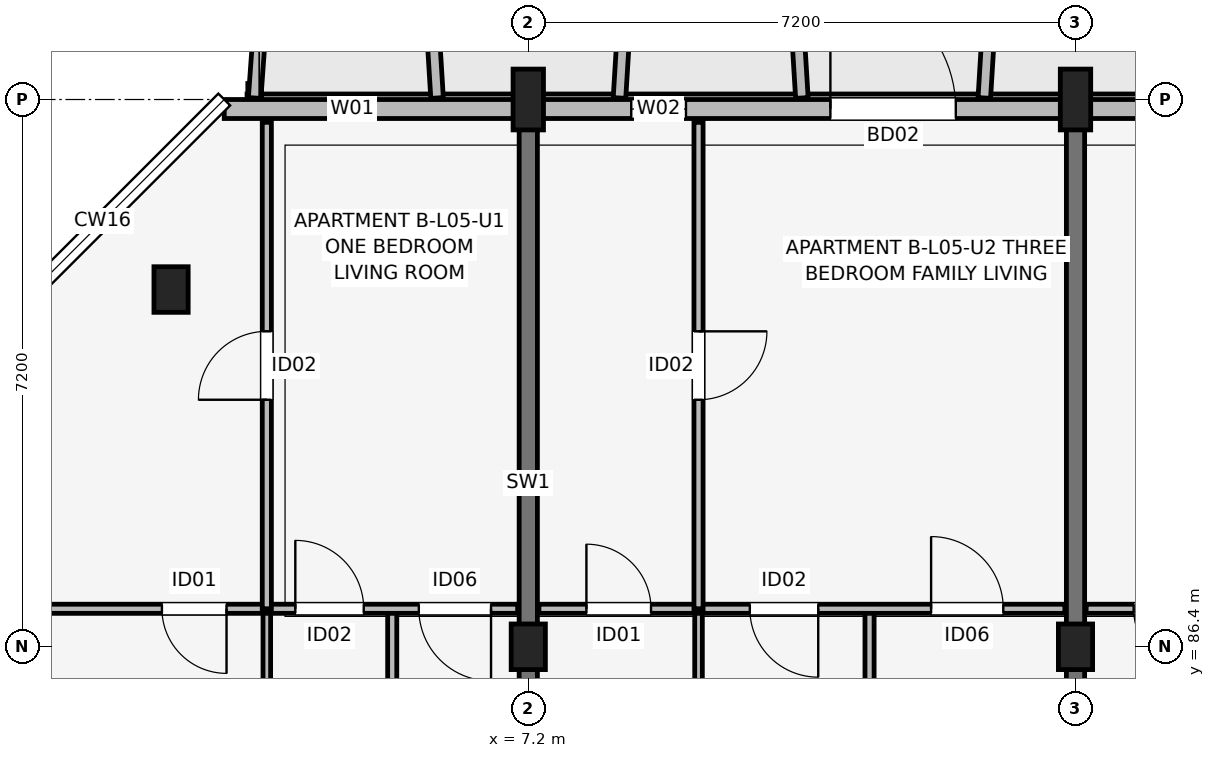
"""IFC4 building model, lengths in metres.
Left out: names, types, materials, properties, quantities, classifications, styles, units other than length and angle.
Written with IfcOpenShell. Run it as: python <this file> out.ifc"""

import sys

from ifc_helpers import new_model, si_unit, direction, frame, frame_2d, origin, origin_2d, place, context, subcontext, project, spatial, rectangle, extrude, element, fill, save


model = new_model("IFC4")
c1 = context("Model", 3, precision=1e-05, world=origin(), true_north=direction((0.0, 1.0)))
c2 = subcontext(c1, "Body", "Model", "MODEL_VIEW")
j1 = project(units=[si_unit("LENGTHUNIT", "METRE"), si_unit("PLANEANGLEUNIT", "RADIAN")], contexts=[c1])
p1 = place(None, origin())
s1 = spatial("IfcSite", under=j1, at=p1, CompositionType="ELEMENT")
p2 = place(p1, origin())
s2 = spatial("IfcBuilding", under=s1, at=p2, CompositionType="ELEMENT")
p3 = place(p2, frame((0.0, 0.0, 18.15)))
s3 = spatial("IfcBuildingStorey", under=s2, at=p3, CompositionType="ELEMENT", Elevation=18.15)
for number, where, z_axis, x_axis in (
    (1, (2.5, 91.1, 0.0), (0.0, 0.0, 1.0), (1.0, 0.0, 0.0)),
    (2, (7.2, 86.4, 0.0), (0.0, 0.0, 1.0), (1.0, 0.0, 0.0)),
):
    element("IfcColumn", number, at=place(p3, frame(where, z_axis=z_axis, x_axis=x_axis)), inside=s3, PredefinedType="COLUMN", context=c2, shape_type="SweptSolid", body=[
        extrude(rectangle(XDim=0.45, YDim=0.6, at=origin_2d()), origin(), (0.0, 0.0, 1.0), 3.15),
    ])
p4 = place(p3, frame((7.2, 93.6, 0.0), z_axis=(0.0, 0.0, 1.0), x_axis=(1.0, 0.0, 0.0)))
e3 = element("IfcColumn", 3, at=p4, inside=s3, PredefinedType="COLUMN", context=c2, shape_type="SweptSolid", body=[
    extrude(rectangle(XDim=0.4, YDim=0.8, at=origin_2d()), origin(), (0.0, 0.0, 1.0), 3.15),
])
p5 = place(p3, frame((14.4, 86.4, 0.0), z_axis=(0.0, 0.0, 1.0), x_axis=(1.0, 0.0, 0.0)))
e4 = element("IfcColumn", 4, at=p5, inside=s3, PredefinedType="COLUMN", context=c2, shape_type="SweptSolid", body=[
    extrude(rectangle(XDim=0.45, YDim=0.6, at=origin_2d()), origin(), (0.0, 0.0, 1.0), 3.15),
])
p6 = place(p3, frame((14.4, 93.6, 0.0), z_axis=(0.0, 0.0, 1.0), x_axis=(1.0, 0.0, 0.0)))
e5 = element("IfcColumn", 5, at=p6, inside=s3, PredefinedType="COLUMN", context=c2, shape_type="SweptSolid", body=[
    extrude(rectangle(XDim=0.4, YDim=0.8, at=origin_2d()), origin(), (0.0, 0.0, 1.0), 3.15),
])
for number, where, z_axis, x_axis in (
    (6, (7.2, 83.85, 0.0), (0.0, 0.0, 1.0), (0.0, 1.0, 0.0)),
    (7, (14.4, 83.85, 0.0), (0.0, 0.0, 1.0), (0.0, 1.0, 0.0)),
):
    element("IfcWall", number, at=place(p3, frame(where, z_axis=z_axis, x_axis=x_axis)), inside=s3, PredefinedType="SHEAR", context=c2, shape_type="SweptSolid", body=[
        extrude(rectangle(XDim=9.4, YDim=0.24, at=frame_2d((4.7, 0.0))), origin(), (0.0, 0.0, 1.0), 3.15),
    ])
p7 = place(p3, frame((32.8, 93.475, 0.0), z_axis=(0.0, 0.0, 1.0), x_axis=(-1.0, 0.0, 0.0)))
e8 = element("IfcWall", 8, at=p7, inside=s3, PredefinedType="SOLIDWALL", context=c2, shape_type="SweptSolid", body=[
    extrude(rectangle(XDim=29.6, YDim=0.25, at=frame_2d((14.8, 0.0))), origin(), (0.0, 0.0, 1.0), 2.43),
])
p8 = place(p7, frame((21.625, 0.0, 0.0), z_axis=(0.0, 0.0, 1.0), x_axis=(-1.0, 0.0, 0.0)))
e9 = element("IfcOpeningElement", 9, at=p8, cuts=e8, PredefinedType="OPENING", context=c2, shape_type="SweptSolid", body=[
    extrude(rectangle(XDim=1.65, YDim=2.15, at=frame_2d((0.825, 1.075))), frame((0.0, 0.135, 0.0), z_axis=(0.0, -1.0, 0.0), x_axis=(1.0, 0.0, 0.0)), (0.0, 0.0, 1.0), 0.27),
])
p9 = place(p7, frame((7.15, 0.0, 0.0), z_axis=(0.0, 0.0, 1.0), x_axis=(-1.0, 0.0, 0.0)))
e10 = element("IfcOpeningElement", 10, at=p9, cuts=e8, PredefinedType="OPENING", context=c2, shape_type="SweptSolid", body=[
    extrude(rectangle(XDim=1.5, YDim=2.15, at=frame_2d((0.75, 1.075))), frame((0.0, 0.135, 0.0), z_axis=(0.0, -1.0, 0.0), x_axis=(1.0, 0.0, 0.0)), (0.0, 0.0, 1.0), 0.27),
])
p10 = place(p7, frame((27.615, 0.0, 0.75)))
e11 = element("IfcOpeningElement", 11, at=p10, cuts=e8, PredefinedType="OPENING", context=c2, shape_type="SweptSolid", body=[
    extrude(rectangle(XDim=0.6, YDim=1.25, at=frame_2d((0.3, 0.625))), frame((0.0, 0.135, 0.0), z_axis=(0.0, -1.0, 0.0), x_axis=(1.0, 0.0, 0.0)), (0.0, 0.0, 1.0), 0.27),
])
p11 = place(p7, frame((23.525, 0.0, 0.75)))
e12 = element("IfcOpeningElement", 12, at=p11, cuts=e8, PredefinedType="OPENING", context=c2, shape_type="SweptSolid", body=[
    extrude(rectangle(XDim=0.72, YDim=1.35, at=frame_2d((0.36, 0.675))), frame((0.0, 0.135, 0.0), z_axis=(0.0, -1.0, 0.0), x_axis=(1.0, 0.0, 0.0)), (0.0, 0.0, 1.0), 0.27),
])
p12 = place(p7, frame((15.0, 0.0, 0.67)))
e13 = element("IfcOpeningElement", 13, at=p12, cuts=e8, PredefinedType="OPENING", context=c2, shape_type="SweptSolid", body=[
    extrude(rectangle(XDim=2.0, YDim=1.65, at=frame_2d((1.0, 0.825))), frame((0.0, 0.135, 0.0), z_axis=(0.0, -1.0, 0.0), x_axis=(1.0, 0.0, 0.0)), (0.0, 0.0, 1.0), 0.27),
])
p13 = place(p7, frame((9.125, 0.0, 0.75)))
e14 = element("IfcOpeningElement", 14, at=p13, cuts=e8, PredefinedType="OPENING", context=c2, shape_type="SweptSolid", body=[
    extrude(rectangle(XDim=0.72, YDim=1.35, at=frame_2d((0.36, 0.675))), frame((0.0, 0.135, 0.0), z_axis=(0.0, -1.0, 0.0), x_axis=(1.0, 0.0, 0.0)), (0.0, 0.0, 1.0), 0.27),
])
p14 = place(p7, frame((0.525, 0.0, 0.67)))
e15 = element("IfcOpeningElement", 15, at=p14, cuts=e8, PredefinedType="OPENING", context=c2, shape_type="SweptSolid", body=[
    extrude(rectangle(XDim=2.15, YDim=1.65, at=frame_2d((1.075, 0.825))), frame((0.0, 0.135, 0.0), z_axis=(0.0, -1.0, 0.0), x_axis=(1.0, 0.0, 0.0)), (0.0, 0.0, 1.0), 0.27),
])
p15 = place(p3, frame((3.6, 93.62, 0.0), z_axis=(0.0, 0.0, 1.0), x_axis=(0.071194071069, 0.997462482625, 0.0)))
e16 = element("IfcWall", 16, at=p15, inside=s3, PredefinedType="ELEMENTEDWALL", context=c2, shape_type="SweptSolid", body=[
    extrude(rectangle(XDim=1.965, YDim=0.165, at=frame_2d((0.982, 0.0))), origin(), (0.0, 0.0, 1.0), 2.95),
])
p16 = place(p3, frame((6.0, 93.62, 0.0), z_axis=(0.0, 0.0, 1.0), x_axis=(-0.061170732449, 0.998127317276, 0.0)))
e17 = element("IfcWall", 17, at=p16, inside=s3, PredefinedType="ELEMENTEDWALL", context=c2, shape_type="SweptSolid", body=[
    extrude(rectangle(XDim=1.964, YDim=0.165, at=frame_2d((0.982, 0.0))), origin(), (0.0, 0.0, 1.0), 2.95),
])
for number, where, z_axis, x_axis in (
    (18, (8.4, 93.62, 0.0), (0.0, 0.0, 1.0), (0.061, 0.998, 0.0)),
    (19, (10.8, 93.62, 0.0), (0.0, 0.0, 1.0), (-0.061, 0.998, 0.0)),
    (20, (13.2, 93.62, 0.0), (0.0, 0.0, 1.0), (0.061, 0.998, 0.0)),
):
    element("IfcWall", number, at=place(p3, frame(where, z_axis=z_axis, x_axis=x_axis)), inside=s3, PredefinedType="ELEMENTEDWALL", context=c2, shape_type="SweptSolid", body=[
        extrude(rectangle(XDim=1.964, YDim=0.165, at=frame_2d((0.982, 0.0))), origin(), (0.0, 0.0, 1.0), 2.53),
    ])
p17 = place(p3, frame((3.76, 83.7, 0.0), z_axis=(0.0, 0.0, 1.0), x_axis=(0.0, 1.0, 0.0)))
e21 = element("IfcWall", 21, at=p17, inside=s3, PredefinedType="PARTITIONING", context=c2, shape_type="SweptSolid", body=[
    extrude(rectangle(XDim=3.2, YDim=0.1, at=frame_2d((1.6, 0.0))), origin(), (0.0, 0.0, 1.0), 2.375),
])
p18 = place(p3, frame((5.41, 83.7, 0.0), z_axis=(0.0, 0.0, 1.0), x_axis=(0.0, 1.0, 0.0)))
e22 = element("IfcWall", 22, at=p18, inside=s3, PredefinedType="PARTITIONING", context=c2, shape_type="SweptSolid", body=[
    extrude(rectangle(XDim=3.2, YDim=0.12, at=frame_2d((1.6, 0.0))), origin(), (0.0, 0.0, 1.0), 2.375),
])
p19 = place(p3, frame((0.14, 86.9, 0.0), z_axis=(0.0, 0.0, 1.0), x_axis=(1.0, 0.0, 0.0)))
e23 = element("IfcWall", 23, at=p19, inside=s3, PredefinedType="PARTITIONING", context=c2, shape_type="SweptSolid", body=[
    extrude(rectangle(XDim=6.92, YDim=0.12, at=frame_2d((3.46, 0.0))), origin(), (0.0, 0.0, 1.0), 2.38),
])
p20 = place(p19, frame((3.09, 0.0, 0.0), z_axis=(0.0, 0.0, 1.0), x_axis=(-1.0, 0.0, 0.0)))
e24 = element("IfcOpeningElement", 24, at=p20, cuts=e23, PredefinedType="OPENING", context=c2, shape_type="SweptSolid", body=[
    extrude(rectangle(XDim=0.85, YDim=2.08, at=frame_2d((0.425, 1.04))), frame((0.0, 0.07, 0.0), z_axis=(0.0, -1.0, 0.0), x_axis=(1.0, 0.0, 0.0)), (0.0, 0.0, 1.0), 0.14),
])
p21 = place(p19, frame((3.995, 0.0, 0.0)))
e25 = element("IfcOpeningElement", 25, at=p21, cuts=e23, PredefinedType="OPENING", context=c2, shape_type="SweptSolid", body=[
    extrude(rectangle(XDim=0.9, YDim=2.08, at=frame_2d((0.45, 1.04))), frame((0.0, 0.07, 0.0), z_axis=(0.0, -1.0, 0.0), x_axis=(1.0, 0.0, 0.0)), (0.0, 0.0, 1.0), 0.14),
])
p22 = place(p19, frame((6.57, 0.0, 0.0), z_axis=(0.0, 0.0, 1.0), x_axis=(-1.0, 0.0, 0.0)))
e26 = element("IfcOpeningElement", 26, at=p22, cuts=e23, PredefinedType="OPENING", context=c2, shape_type="SweptSolid", body=[
    extrude(rectangle(XDim=0.95, YDim=2.08, at=frame_2d((0.475, 1.04))), frame((0.0, 0.07, 0.0), z_axis=(0.0, -1.0, 0.0), x_axis=(1.0, 0.0, 0.0)), (0.0, 0.0, 1.0), 0.14),
])
p23 = place(p3, frame((3.76, 86.9, 0.0), z_axis=(0.0, 0.0, 1.0), x_axis=(0.0, 1.0, 0.0)))
e27 = element("IfcWall", 27, at=p23, inside=s3, PredefinedType="PARTITIONING", context=c2, shape_type="SweptSolid", body=[
    extrude(rectangle(XDim=6.4, YDim=0.12, at=frame_2d((3.2, 0.0))), origin(), (0.0, 0.0, 1.0), 2.38),
])
p24 = place(p23, frame((2.75, 0.0, 0.0)))
e28 = element("IfcOpeningElement", 28, at=p24, cuts=e27, PredefinedType="OPENING", context=c2, shape_type="SweptSolid", body=[
    extrude(rectangle(XDim=0.9, YDim=2.08, at=frame_2d((0.45, 1.04))), frame((0.0, 0.07, 0.0), z_axis=(0.0, -1.0, 0.0), x_axis=(1.0, 0.0, 0.0)), (0.0, 0.0, 1.0), 0.14),
])
p25 = place(p3, frame((9.44, 83.7, 0.0), z_axis=(0.0, 0.0, 1.0), x_axis=(0.0, 1.0, 0.0)))
e29 = element("IfcWall", 29, at=p25, inside=s3, PredefinedType="PARTITIONING", context=c2, shape_type="SweptSolid", body=[
    extrude(rectangle(XDim=3.2, YDim=0.1, at=frame_2d((1.6, 0.0))), origin(), (0.0, 0.0, 1.0), 2.375),
])
p26 = place(p3, frame((11.69, 83.7, 0.0), z_axis=(0.0, 0.0, 1.0), x_axis=(0.0, 1.0, 0.0)))
e30 = element("IfcWall", 30, at=p26, inside=s3, PredefinedType="PARTITIONING", context=c2, shape_type="SweptSolid", body=[
    extrude(rectangle(XDim=3.2, YDim=0.12, at=frame_2d((1.6, 0.0))), origin(), (0.0, 0.0, 1.0), 2.375),
])
p27 = place(p3, frame((7.34, 86.9, 0.0), z_axis=(0.0, 0.0, 1.0), x_axis=(1.0, 0.0, 0.0)))
e31 = element("IfcWall", 31, at=p27, inside=s3, PredefinedType="PARTITIONING", context=c2, shape_type="SweptSolid", body=[
    extrude(rectangle(XDim=6.92, YDim=0.12, at=frame_2d((3.46, 0.0))), origin(), (0.0, 0.0, 1.0), 2.38),
])
p28 = place(p27, frame((0.625, 0.0, 0.0)))
e32 = element("IfcOpeningElement", 32, at=p28, cuts=e31, PredefinedType="OPENING", context=c2, shape_type="SweptSolid", body=[
    extrude(rectangle(XDim=0.85, YDim=2.08, at=frame_2d((0.425, 1.04))), frame((0.0, 0.07, 0.0), z_axis=(0.0, -1.0, 0.0), x_axis=(1.0, 0.0, 0.0)), (0.0, 0.0, 1.0), 0.14),
])
p29 = place(p27, frame((3.675, 0.0, 0.0), z_axis=(0.0, 0.0, 1.0), x_axis=(-1.0, 0.0, 0.0)))
e33 = element("IfcOpeningElement", 33, at=p29, cuts=e31, PredefinedType="OPENING", context=c2, shape_type="SweptSolid", body=[
    extrude(rectangle(XDim=0.9, YDim=2.08, at=frame_2d((0.45, 1.04))), frame((0.0, 0.07, 0.0), z_axis=(0.0, -1.0, 0.0), x_axis=(1.0, 0.0, 0.0)), (0.0, 0.0, 1.0), 0.14),
])
p30 = place(p27, frame((5.16, 0.0, 0.0)))
e34 = element("IfcOpeningElement", 34, at=p30, cuts=e31, PredefinedType="OPENING", context=c2, shape_type="SweptSolid", body=[
    extrude(rectangle(XDim=0.95, YDim=2.08, at=frame_2d((0.475, 1.04))), frame((0.0, 0.07, 0.0), z_axis=(0.0, -1.0, 0.0), x_axis=(1.0, 0.0, 0.0)), (0.0, 0.0, 1.0), 0.14),
])
p31 = place(p3, frame((9.44, 86.9, 0.0), z_axis=(0.0, 0.0, 1.0), x_axis=(0.0, 1.0, 0.0)))
e35 = element("IfcWall", 35, at=p31, inside=s3, PredefinedType="PARTITIONING", context=c2, shape_type="SweptSolid", body=[
    extrude(rectangle(XDim=6.4, YDim=0.12, at=frame_2d((3.2, 0.0))), origin(), (0.0, 0.0, 1.0), 2.38),
])
p32 = place(p31, frame((3.65, 0.0, 0.0), z_axis=(0.0, 0.0, 1.0), x_axis=(-1.0, 0.0, 0.0)))
e36 = element("IfcOpeningElement", 36, at=p32, cuts=e35, PredefinedType="OPENING", context=c2, shape_type="SweptSolid", body=[
    extrude(rectangle(XDim=0.9, YDim=2.08, at=frame_2d((0.45, 1.04))), frame((0.0, 0.07, 0.0), z_axis=(0.0, -1.0, 0.0), x_axis=(1.0, 0.0, 0.0)), (0.0, 0.0, 1.0), 0.14),
])
p33 = place(p3, frame((14.54, 86.9, 0.0), z_axis=(0.0, 0.0, 1.0), x_axis=(1.0, 0.0, 0.0)))
e37 = element("IfcWall", 37, at=p33, inside=s3, PredefinedType="PARTITIONING", context=c2, shape_type="SweptSolid", body=[
    extrude(rectangle(XDim=6.92, YDim=0.12, at=frame_2d((3.46, 0.0))), origin(), (0.0, 0.0, 1.0), 2.38),
])
p34 = place(p33, frame((1.475, 0.0, 0.0), z_axis=(0.0, 0.0, 1.0), x_axis=(-1.0, 0.0, 0.0)))
e38 = element("IfcOpeningElement", 38, at=p34, cuts=e37, PredefinedType="OPENING", context=c2, shape_type="SweptSolid", body=[
    extrude(rectangle(XDim=0.85, YDim=2.08, at=frame_2d((0.425, 1.04))), frame((0.0, 0.07, 0.0), z_axis=(0.0, -1.0, 0.0), x_axis=(1.0, 0.0, 0.0)), (0.0, 0.0, 1.0), 0.14),
])
p35 = place(p33, frame((2.625, 0.0, 0.0)))
e39 = element("IfcOpeningElement", 39, at=p35, cuts=e37, PredefinedType="OPENING", context=c2, shape_type="SweptSolid", body=[
    extrude(rectangle(XDim=0.9, YDim=2.08, at=frame_2d((0.45, 1.04))), frame((0.0, 0.07, 0.0), z_axis=(0.0, -1.0, 0.0), x_axis=(1.0, 0.0, 0.0)), (0.0, 0.0, 1.0), 0.14),
])
p36 = place(p33, frame((5.96, 0.0, 0.0), z_axis=(0.0, 0.0, 1.0), x_axis=(-1.0, 0.0, 0.0)))
e40 = element("IfcOpeningElement", 40, at=p36, cuts=e37, PredefinedType="OPENING", context=c2, shape_type="SweptSolid", body=[
    extrude(rectangle(XDim=0.95, YDim=2.08, at=frame_2d((0.475, 1.04))), frame((0.0, 0.07, 0.0), z_axis=(0.0, -1.0, 0.0), x_axis=(1.0, 0.0, 0.0)), (0.0, 0.0, 1.0), 0.14),
])
p37 = place(p8, origin())
e41 = element("IfcDoor", 41, at=p37, inside=s3, OperationType="SINGLE_SWING_RIGHT", PredefinedType="DOOR", context=c2, shape_type="SweptSolid", body=[
    extrude(rectangle(XDim=1.65, YDim=2.15, at=frame_2d((0.825, 1.075))), frame((0.0, 0.025, 0.0), z_axis=(0.0, -1.0, 0.0), x_axis=(1.0, 0.0, 0.0)), (0.0, 0.0, 1.0), 0.05),
])
fill(e9, e41)
p38 = place(p10, origin())
e42 = element("IfcWindow", 42, at=p38, inside=s3, PartitioningType="SINGLE_PANEL", PredefinedType="WINDOW", context=c2, shape_type="SweptSolid", body=[
    extrude(rectangle(XDim=0.6, YDim=1.25, at=frame_2d((0.3, 0.625))), frame((0.0, 0.03, 0.0), z_axis=(0.0, -1.0, 0.0), x_axis=(1.0, 0.0, 0.0)), (0.0, 0.0, 1.0), 0.06),
])
fill(e11, e42)
p39 = place(p11, origin())
e43 = element("IfcWindow", 43, at=p39, inside=s3, PartitioningType="SINGLE_PANEL", PredefinedType="WINDOW", context=c2, shape_type="SweptSolid", body=[
    extrude(rectangle(XDim=0.72, YDim=1.35, at=frame_2d((0.36, 0.675))), frame((0.0, 0.03, 0.0), z_axis=(0.0, -1.0, 0.0), x_axis=(1.0, 0.0, 0.0)), (0.0, 0.0, 1.0), 0.06),
])
fill(e12, e43)
p40 = place(p20, origin())
e44 = element("IfcDoor", 44, at=p40, inside=s3, OperationType="SINGLE_SWING_RIGHT", PredefinedType="DOOR", context=c2, shape_type="SweptSolid", body=[
    extrude(rectangle(XDim=0.85, YDim=2.08, at=frame_2d((0.425, 1.04))), frame((0.0, 0.025, 0.0), z_axis=(0.0, -1.0, 0.0), x_axis=(1.0, 0.0, 0.0)), (0.0, 0.0, 1.0), 0.05),
])
fill(e24, e44)
p41 = place(p21, origin())
e45 = element("IfcDoor", 45, at=p41, inside=s3, OperationType="SINGLE_SWING_LEFT", PredefinedType="DOOR", context=c2, shape_type="SweptSolid", body=[
    extrude(rectangle(XDim=0.9, YDim=2.08, at=frame_2d((0.45, 1.04))), frame((0.0, 0.025, 0.0), z_axis=(0.0, -1.0, 0.0), x_axis=(1.0, 0.0, 0.0)), (0.0, 0.0, 1.0), 0.05),
])
fill(e25, e45)
p42 = place(p22, origin())
e46 = element("IfcDoor", 46, at=p42, inside=s3, OperationType="SINGLE_SWING_RIGHT", PredefinedType="DOOR", context=c2, shape_type="SweptSolid", body=[
    extrude(rectangle(XDim=0.95, YDim=2.08, at=frame_2d((0.475, 1.04))), frame((0.0, 0.025, 0.0), z_axis=(0.0, -1.0, 0.0), x_axis=(1.0, 0.0, 0.0)), (0.0, 0.0, 1.0), 0.05),
])
fill(e26, e46)
p43 = place(p24, origin())
e47 = element("IfcDoor", 47, at=p43, inside=s3, OperationType="SINGLE_SWING_LEFT", PredefinedType="DOOR", context=c2, shape_type="SweptSolid", body=[
    extrude(rectangle(XDim=0.9, YDim=2.08, at=frame_2d((0.45, 1.04))), frame((0.0, 0.025, 0.0), z_axis=(0.0, -1.0, 0.0), x_axis=(1.0, 0.0, 0.0)), (0.0, 0.0, 1.0), 0.05),
])
fill(e28, e47)
p44 = place(p28, origin())
e48 = element("IfcDoor", 48, at=p44, inside=s3, OperationType="SINGLE_SWING_LEFT", PredefinedType="DOOR", context=c2, shape_type="SweptSolid", body=[
    extrude(rectangle(XDim=0.85, YDim=2.08, at=frame_2d((0.425, 1.04))), frame((0.0, 0.025, 0.0), z_axis=(0.0, -1.0, 0.0), x_axis=(1.0, 0.0, 0.0)), (0.0, 0.0, 1.0), 0.05),
])
fill(e32, e48)
p45 = place(p29, origin())
e49 = element("IfcDoor", 49, at=p45, inside=s3, OperationType="SINGLE_SWING_RIGHT", PredefinedType="DOOR", context=c2, shape_type="SweptSolid", body=[
    extrude(rectangle(XDim=0.9, YDim=2.08, at=frame_2d((0.45, 1.04))), frame((0.0, 0.025, 0.0), z_axis=(0.0, -1.0, 0.0), x_axis=(1.0, 0.0, 0.0)), (0.0, 0.0, 1.0), 0.05),
])
fill(e33, e49)
p46 = place(p30, origin())
e50 = element("IfcDoor", 50, at=p46, inside=s3, OperationType="SINGLE_SWING_LEFT", PredefinedType="DOOR", context=c2, shape_type="SweptSolid", body=[
    extrude(rectangle(XDim=0.95, YDim=2.08, at=frame_2d((0.475, 1.04))), frame((0.0, 0.025, 0.0), z_axis=(0.0, -1.0, 0.0), x_axis=(1.0, 0.0, 0.0)), (0.0, 0.0, 1.0), 0.05),
])
fill(e34, e50)
p47 = place(p32, origin())
e51 = element("IfcDoor", 51, at=p47, inside=s3, OperationType="SINGLE_SWING_RIGHT", PredefinedType="DOOR", context=c2, shape_type="SweptSolid", body=[
    extrude(rectangle(XDim=0.9, YDim=2.08, at=frame_2d((0.45, 1.04))), frame((0.0, 0.025, 0.0), z_axis=(0.0, -1.0, 0.0), x_axis=(1.0, 0.0, 0.0)), (0.0, 0.0, 1.0), 0.05),
])
fill(e36, e51)
p48 = place(p34, origin())
e52 = element("IfcDoor", 52, at=p48, inside=s3, OperationType="SINGLE_SWING_RIGHT", PredefinedType="DOOR", context=c2, shape_type="SweptSolid", body=[
    extrude(rectangle(XDim=0.85, YDim=2.08, at=frame_2d((0.425, 1.04))), frame((0.0, 0.025, 0.0), z_axis=(0.0, -1.0, 0.0), x_axis=(1.0, 0.0, 0.0)), (0.0, 0.0, 1.0), 0.05),
])
fill(e38, e52)
save(model, sys.argv[1])
